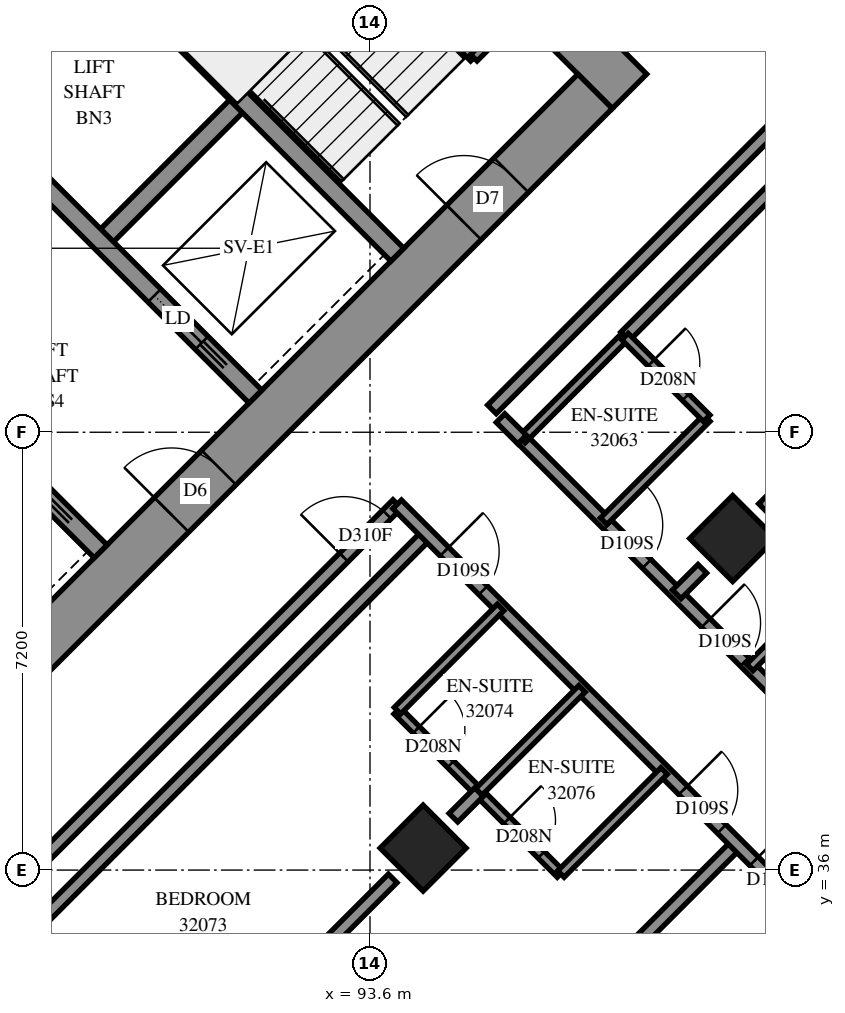
"""IFC4 building model, lengths in metres.
Left out: names, types, materials, properties, quantities, classifications, styles, units other than length and angle.
Written with IfcOpenShell. Run it as: python <this file> out.ifc"""

import sys

from ifc_helpers import new_model, si_unit, direction, frame, frame_2d, origin, origin_2d, place, context, subcontext, project, spatial, rectangle, extrude, element, fill, save


model = new_model("IFC4")
c1 = context("Model", 3, precision=1e-05, world=origin(), true_north=direction((0.0, 1.0)))
c2 = subcontext(c1, "Body", "Model", "MODEL_VIEW")
j1 = project(units=[si_unit("LENGTHUNIT", "METRE"), si_unit("PLANEANGLEUNIT", "RADIAN")], contexts=[c1])
p1 = place(None, origin())
s1 = spatial("IfcSite", under=j1, at=p1, CompositionType="ELEMENT")
p2 = place(p1, origin())
s2 = spatial("IfcBuilding", under=s1, at=p2, CompositionType="ELEMENT")
p3 = place(p2, frame((0.0, 0.0, 118.6)))
s3 = spatial("IfcBuildingStorey", under=s2, at=p3, CompositionType="ELEMENT", Elevation=118.6)
for number, where, z_axis, x_axis in (
    (1, (99.565, 41.453, 0.0), (0.0, 0.0, 1.0), (0.707, -0.707, 0.0)),
    (2, (94.474, 36.362, 0.0), (0.0, 0.0, 1.0), (0.707, -0.707, 0.0)),
):
    element("IfcColumn", number, at=place(p3, frame(where, z_axis=z_axis, x_axis=x_axis)), inside=s3, PredefinedType="COLUMN", context=c2, shape_type="SweptSolid", body=[
        extrude(rectangle(XDim=1.0, YDim=1.0, at=origin_2d()), origin(), (0.0, 0.0, 1.0), 3.1),
    ])
p4 = place(p3, frame((86.554, 60.121, -0.3), z_axis=(0.0, 0.0, 1.0), x_axis=(0.7071067812, -0.7071067812, 0.0)))
e3 = element("IfcWall", 3, at=p4, inside=s3, PredefinedType="SHEAR", context=c2, shape_type="SweptSolid", body=[
    extrude(rectangle(XDim=16.0, YDim=0.8, at=frame_2d((8.0, 0.0))), origin(), (0.0, 0.0, 1.0), 2.7),
])
p5 = place(p4, frame((10.8, 0.0, 0.3)))
e4 = element("IfcOpeningElement", 4, at=p5, cuts=e3, PredefinedType="OPENING", context=c2, shape_type="SweptSolid", body=[
    extrude(rectangle(XDim=0.8, YDim=2.1, at=frame_2d((0.4, 1.05))), frame((0.0, 0.41, 0.0), z_axis=(0.0, -1.0, 0.0), x_axis=(1.0, 0.0, 0.0)), (0.0, 0.0, 1.0), 0.82),
])
p6 = place(p3, frame((87.12, 38.625, -0.3), z_axis=(0.0, 0.0, 1.0), x_axis=(0.7071067812, 0.7071067812, 0.0)))
e5 = element("IfcWall", 5, at=p6, inside=s3, PredefinedType="SHEAR", context=c2, shape_type="SweptSolid", body=[
    extrude(rectangle(XDim=14.4, YDim=0.8, at=frame_2d((7.2, 0.0))), origin(), (0.0, 0.0, 1.0), 2.7),
])
p7 = place(p6, frame((4.55, 0.0, 0.3)))
e6 = element("IfcOpeningElement", 6, at=p7, cuts=e5, PredefinedType="OPENING", context=c2, shape_type="SweptSolid", body=[
    extrude(rectangle(XDim=1.1, YDim=2.1, at=frame_2d((0.55, 1.05))), frame((0.0, 0.41, 0.0), z_axis=(0.0, -1.0, 0.0), x_axis=(1.0, 0.0, 0.0)), (0.0, 0.0, 1.0), 0.82),
])
p8 = place(p6, frame((11.35, 0.0, 0.3)))
e7 = element("IfcOpeningElement", 7, at=p8, cuts=e5, PredefinedType="OPENING", context=c2, shape_type="SweptSolid", body=[
    extrude(rectangle(XDim=1.1, YDim=2.1, at=frame_2d((0.55, 1.05))), frame((0.0, 0.41, 0.0), z_axis=(0.0, -1.0, 0.0), x_axis=(1.0, 0.0, 0.0)), (0.0, 0.0, 1.0), 0.82),
])
for number, where, z_axis, x_axis in (
    (8, (86.625, 48.878, 0.0), (0.0, 0.0, 1.0), (0.707, 0.707, 0.0)),
    (9, (89.17, 46.332, 0.0), (0.0, 0.0, 1.0), (0.707, 0.707, 0.0)),
):
    element("IfcWall", number, at=place(p3, frame(where, z_axis=z_axis, x_axis=x_axis)), inside=s3, PredefinedType="SOLIDWALL", context=c2, shape_type="SweptSolid", body=[
        extrude(rectangle(XDim=3.3, YDim=0.3, at=frame_2d((1.65, 0.0))), origin(), (0.0, 0.0, 1.0), 3.1),
    ])
p9 = place(p3, frame((78.988, 51.423, 0.0), z_axis=(0.0, 0.0, 1.0), x_axis=(0.7071067812, -0.7071067812, 0.0)))
e10 = element("IfcWall", 10, at=p9, inside=s3, PredefinedType="SOLIDWALL", context=c2, shape_type="SweptSolid", body=[
    extrude(rectangle(XDim=14.4, YDim=0.3, at=frame_2d((7.2, 0.0))), origin(), (0.0, 0.0, 1.0), 3.1),
])
p10 = place(p9, frame((1.25, 0.0, 0.0)))
e11 = element("IfcOpeningElement", 11, at=p10, cuts=e10, PredefinedType="OPENING", context=c2, shape_type="SweptSolid", body=[
    extrude(rectangle(XDim=1.1, YDim=2.1, at=frame_2d((0.55, 1.05))), frame((0.0, 0.16, 0.0), z_axis=(0.0, -1.0, 0.0), x_axis=(1.0, 0.0, 0.0)), (0.0, 0.0, 1.0), 0.32),
])
p11 = place(p9, frame((4.85, 0.0, 0.0)))
e12 = element("IfcOpeningElement", 12, at=p11, cuts=e10, PredefinedType="OPENING", context=c2, shape_type="SweptSolid", body=[
    extrude(rectangle(XDim=1.1, YDim=2.1, at=frame_2d((0.55, 1.05))), frame((0.0, 0.16, 0.0), z_axis=(0.0, -1.0, 0.0), x_axis=(1.0, 0.0, 0.0)), (0.0, 0.0, 1.0), 0.32),
])
p12 = place(p9, frame((8.45, 0.0, 0.0)))
e13 = element("IfcOpeningElement", 13, at=p12, cuts=e10, PredefinedType="OPENING", context=c2, shape_type="SweptSolid", body=[
    extrude(rectangle(XDim=1.1, YDim=2.1, at=frame_2d((0.55, 1.05))), frame((0.0, 0.16, 0.0), z_axis=(0.0, -1.0, 0.0), x_axis=(1.0, 0.0, 0.0)), (0.0, 0.0, 1.0), 0.32),
])
p13 = place(p9, frame((12.05, 0.0, 0.0)))
e14 = element("IfcOpeningElement", 14, at=p13, cuts=e10, PredefinedType="OPENING", context=c2, shape_type="SweptSolid", body=[
    extrude(rectangle(XDim=1.1, YDim=2.1, at=frame_2d((0.55, 1.05))), frame((0.0, 0.16, 0.0), z_axis=(0.0, -1.0, 0.0), x_axis=(1.0, 0.0, 0.0)), (0.0, 0.0, 1.0), 0.32),
])
p14 = place(p3, frame((81.534, 53.969, 0.0), z_axis=(0.0, 0.0, 1.0), x_axis=(0.707103309, -0.7071102534, 0.0)))
e15 = element("IfcWall", 15, at=p14, inside=s3, PredefinedType="SOLIDWALL", context=c2, shape_type="SweptSolid", body=[
    extrude(rectangle(XDim=14.4, YDim=0.3, at=frame_2d((7.2, 0.0))), origin(), (0.0, 0.0, 1.0), 3.1),
])
p15 = place(p14, frame((12.05, 0.0, 0.0)))
e16 = element("IfcOpeningElement", 16, at=p15, cuts=e15, PredefinedType="OPENING", context=c2, shape_type="SweptSolid", body=[
    extrude(rectangle(XDim=1.1, YDim=2.1, at=frame_2d((0.55, 1.05))), frame((0.0, 0.16, 0.0), z_axis=(0.0, -1.0, 0.0), x_axis=(1.0, 0.0, 0.0)), (0.0, 0.0, 1.0), 0.32),
])
p16 = place(p3, frame((88.958, 51.211, 0.0), z_axis=(0.0, 0.0, 1.0), x_axis=(0.7070998367, -0.7071137256, 0.0)))
e17 = element("IfcWall", 17, at=p16, inside=s3, PredefinedType="SOLIDWALL", context=c2, shape_type="SweptSolid", body=[
    extrude(rectangle(XDim=7.2, YDim=0.3, at=frame_2d((3.6, 0.0))), origin(), (0.0, 0.0, 1.0), 3.1),
])
p17 = place(p3, frame((91.313, 53.354, 0.0), z_axis=(0.0, 0.0, 1.0), x_axis=(0.7071067812, -0.7071067812, 0.0)))
e18 = element("IfcWall", 18, at=p17, inside=s3, PredefinedType="PARTITIONING", context=c2, shape_type="SweptSolid", body=[
    extrude(rectangle(XDim=5.65, YDim=0.15, at=frame_2d((2.825, 0.0))), origin(), (0.0, 0.0, 1.0), 3.1),
])
p18 = place(p3, frame((95.308, 49.358, 0.0), z_axis=(0.0, 0.0, 1.0), x_axis=(0.70705776, 0.707155799, 0.0)))
e19 = element("IfcWall", 19, at=p18, inside=s3, PredefinedType="PARTITIONING", context=c2, shape_type="SweptSolid", body=[
    extrude(rectangle(XDim=1.02, YDim=0.15, at=frame_2d((0.51, 0.0))), origin(), (0.0, 0.0, 1.0), 3.1),
])
p19 = place(p3, frame((86.329, 33.31, 0.0), z_axis=(0.0, 0.0, 1.0), x_axis=(0.7071067812, 0.7071067812, 0.0)))
e20 = element("IfcWall", 20, at=p19, inside=s3, PredefinedType="PARTITIONING", context=c2, shape_type="SweptSolid", body=[
    extrude(rectangle(XDim=11.617, YDim=0.2, at=frame_2d((5.808, 0.0))), origin(), (0.0, 0.0, 1.0), 3.1),
])
p20 = place(p3, frame((91.45, 28.248, 0.0), z_axis=(0.0, 0.0, 1.0), x_axis=(0.7071931644, 0.7070203875, 0.0)))
e21 = element("IfcWall", 21, at=p20, inside=s3, PredefinedType="PARTITIONING", context=c2, shape_type="SweptSolid", body=[
    extrude(rectangle(XDim=11.576, YDim=0.2, at=frame_2d((5.788, 0.0))), origin(), (0.0, 0.0, 1.0), 3.1),
])
p21 = place(p3, frame((86.835, 34.806, 0.0), z_axis=(0.0, 0.0, 1.0), x_axis=(0.7071067812, 0.7071067812, 0.0)))
e22 = element("IfcWall", 22, at=p21, inside=s3, PredefinedType="PARTITIONING", context=c2, shape_type="SweptSolid", body=[
    extrude(rectangle(XDim=10.201, YDim=0.2, at=frame_2d((5.1, 0.0))), origin(), (0.0, 0.0, 1.0), 3.1),
])
p22 = place(p21, frame((8.959, 0.0, 0.0)))
e23 = element("IfcOpeningElement", 23, at=p22, cuts=e22, PredefinedType="OPENING", context=c2, shape_type="SweptSolid", body=[
    extrude(rectangle(XDim=1.0, YDim=2.1, at=frame_2d((0.5, 1.05))), frame((0.0, 0.11, 0.0), z_axis=(0.0, -1.0, 0.0), x_axis=(1.0, 0.0, 0.0)), (0.0, 0.0, 1.0), 0.22),
])
p23 = place(p3, frame((94.047, 42.015, 0.0), z_axis=(0.0, 0.0, 1.0), x_axis=(0.7071067812, -0.7071067812, 0.0)))
e24 = element("IfcWall", 24, at=p23, inside=s3, PredefinedType="PARTITIONING", context=c2, shape_type="SweptSolid", body=[
    extrude(rectangle(XDim=9.6, YDim=0.2, at=frame_2d((4.8, 0.0))), origin(), (0.0, 0.0, 1.0), 3.1),
])
p24 = place(p23, frame((1.099, 0.0, 0.0)))
e25 = element("IfcOpeningElement", 25, at=p24, cuts=e24, PredefinedType="OPENING", context=c2, shape_type="SweptSolid", body=[
    extrude(rectangle(XDim=0.9, YDim=2.1, at=frame_2d((0.45, 1.05))), frame((0.0, 0.11, 0.0), z_axis=(0.0, -1.0, 0.0), x_axis=(1.0, 0.0, 0.0)), (0.0, 0.0, 1.0), 0.22),
])
p25 = place(p23, frame((6.649, 0.0, 0.0)))
e26 = element("IfcOpeningElement", 26, at=p25, cuts=e24, PredefinedType="OPENING", context=c2, shape_type="SweptSolid", body=[
    extrude(rectangle(XDim=0.9, YDim=2.1, at=frame_2d((0.45, 1.05))), frame((0.0, 0.11, 0.0), z_axis=(0.0, -1.0, 0.0), x_axis=(1.0, 0.0, 0.0)), (0.0, 0.0, 1.0), 0.22),
])
p26 = place(p23, frame((8.3, 0.0, 0.0)))
e27 = element("IfcOpeningElement", 27, at=p26, cuts=e24, PredefinedType="OPENING", context=c2, shape_type="SweptSolid", body=[
    extrude(rectangle(XDim=0.9, YDim=2.1, at=frame_2d((0.45, 1.05))), frame((0.0, 0.11, 0.0), z_axis=(0.0, -1.0, 0.0), x_axis=(1.0, 0.0, 0.0)), (0.0, 0.0, 1.0), 0.22),
])
p27 = place(p3, frame((96.103, 43.083, 0.0), z_axis=(0.0, 0.0, 1.0), x_axis=(0.7071067812, -0.7071067812, 0.0)))
e28 = element("IfcWall", 28, at=p27, inside=s3, PredefinedType="PARTITIONING", context=c2, shape_type="SweptSolid", body=[
    extrude(rectangle(XDim=8.491, YDim=0.2, at=frame_2d((4.245, 0.0))), origin(), (0.0, 0.0, 1.0), 3.1),
])
p28 = place(p27, frame((1.995, 0.0, 0.0)))
e29 = element("IfcOpeningElement", 29, at=p28, cuts=e28, PredefinedType="OPENING", context=c2, shape_type="SweptSolid", body=[
    extrude(rectangle(XDim=0.9, YDim=2.1, at=frame_2d((0.45, 1.05))), frame((0.0, 0.11, 0.0), z_axis=(0.0, -1.0, 0.0), x_axis=(1.0, 0.0, 0.0)), (0.0, 0.0, 1.0), 0.22),
])
p29 = place(p27, frame((4.27, 0.0, 0.0)))
e30 = element("IfcOpeningElement", 30, at=p29, cuts=e28, PredefinedType="OPENING", context=c2, shape_type="SweptSolid", body=[
    extrude(rectangle(XDim=0.9, YDim=2.1, at=frame_2d((0.45, 1.05))), frame((0.0, 0.11, 0.0), z_axis=(0.0, -1.0, 0.0), x_axis=(1.0, 0.0, 0.0)), (0.0, 0.0, 1.0), 0.22),
])
p30 = place(p3, frame((95.606, 43.577, 0.0), z_axis=(0.0, 0.0, 1.0), x_axis=(0.7071067812, 0.7071067812, 0.0)))
e31 = element("IfcWall", 31, at=p30, inside=s3, PredefinedType="PARTITIONING", context=c2, shape_type="SweptSolid", body=[
    extrude(rectangle(XDim=7.798, YDim=0.2, at=frame_2d((3.899, 0.0))), origin(), (0.0, 0.0, 1.0), 3.1),
])
p31 = place(p3, frame((97.795, 44.777, 0.0), z_axis=(0.0, 0.0, 1.0), x_axis=(0.7071136921, 0.7070998702, 0.0)))
e32 = element("IfcWall", 32, at=p31, inside=s3, PredefinedType="PARTITIONING", context=c2, shape_type="SweptSolid", body=[
    extrude(rectangle(XDim=7.235, YDim=0.2, at=frame_2d((3.617, 0.0))), origin(), (0.0, 0.0, 1.0), 3.1),
])
for number, where, z_axis, x_axis in (
    (33, (89.881, 31.771, 0.0), (0.0, 0.0, 1.0), (0.707, 0.707, 0.0)),
    (34, (100.063, 41.953, 0.0), (0.0, 0.0, 1.0), (0.707, 0.707, 0.0)),
):
    element("IfcWall", number, at=place(p3, frame(where, z_axis=z_axis, x_axis=x_axis)), inside=s3, PredefinedType="PARTITIONING", context=c2, shape_type="SweptSolid", body=[
        extrude(rectangle(XDim=5.787, YDim=0.2, at=frame_2d((2.893, 0.0))), origin(), (0.0, 0.0, 1.0), 3.1),
    ])
p32 = place(p3, frame((94.047, 38.621, 0.0), z_axis=(0.0, 0.0, 1.0), x_axis=(0.7071067812, -0.7071067812, 0.0)))
e35 = element("IfcWall", 35, at=p32, inside=s3, PredefinedType="PARTITIONING", context=c2, shape_type="SweptSolid", body=[
    extrude(rectangle(XDim=3.799, YDim=0.15, at=frame_2d((1.899, 0.0))), origin(), (0.0, 0.0, 1.0), 3.1),
])
p33 = place(p32, frame((0.444, 0.0, 0.0)))
e36 = element("IfcOpeningElement", 36, at=p33, cuts=e35, PredefinedType="OPENING", context=c2, shape_type="SweptSolid", body=[
    extrude(rectangle(XDim=0.8, YDim=2.1, at=frame_2d((0.4, 1.05))), frame((0.0, 0.085, 0.0), z_axis=(0.0, -1.0, 0.0), x_axis=(1.0, 0.0, 0.0)), (0.0, 0.0, 1.0), 0.17),
])
p34 = place(p32, frame((2.551, 0.0, 0.0)))
e37 = element("IfcOpeningElement", 37, at=p34, cuts=e35, PredefinedType="OPENING", context=c2, shape_type="SweptSolid", body=[
    extrude(rectangle(XDim=0.8, YDim=2.1, at=frame_2d((0.4, 1.05))), frame((0.0, 0.085, 0.0), z_axis=(0.0, -1.0, 0.0), x_axis=(1.0, 0.0, 0.0)), (0.0, 0.0, 1.0), 0.17),
])
p35 = place(p3, frame((99.071, 51.133, 0.0), z_axis=(0.0, 0.0, 1.0), x_axis=(0.7071067812, -0.7071067812, 0.0)))
e38 = element("IfcWall", 38, at=p35, inside=s3, PredefinedType="PARTITIONING", context=c2, shape_type="SweptSolid", body=[
    extrude(rectangle(XDim=2.893, YDim=0.2, at=frame_2d((1.447, 0.0))), origin(), (0.0, 0.0, 1.0), 3.1),
])
for number, where, z_axis, x_axis in (
    (39, (95.389, 37.285, 0.0), (0.0, 0.0, 1.0), (0.708, 0.707, 0.0)),
    (40, (94.052, 38.622, 0.0), (0.0, 0.0, 1.0), (0.707, 0.708, 0.0)),
    (41, (96.739, 35.935, 0.0), (0.0, 0.0, 1.0), (0.708, 0.707, 0.0)),
    (42, (99.143, 33.531, 0.0), (0.0, 0.0, 1.0), (0.708, 0.707, 0.0)),
):
    element("IfcWall", number, at=place(p3, frame(where, z_axis=z_axis, x_axis=x_axis)), inside=s3, PredefinedType="PARTITIONING", context=c2, shape_type="SweptSolid", body=[
        extrude(rectangle(XDim=2.4, YDim=0.15, at=frame_2d((1.2, 0.0))), origin(), (0.0, 0.0, 1.0), 3.1),
    ])
for number, where, z_axis, x_axis in (
    (43, (97.443, 41.737, 0.0), (0.0, 0.0, 1.0), (0.707, 0.707, 0.0)),
    (44, (96.099, 43.081, 0.0), (0.0, 0.0, 1.0), (0.707, 0.707, 0.0)),
    (45, (99.847, 39.333, 0.0), (0.0, 0.0, 1.0), (0.707, 0.707, 0.0)),
):
    element("IfcWall", number, at=place(p3, frame(where, z_axis=z_axis, x_axis=x_axis)), inside=s3, PredefinedType="PARTITIONING", context=c2, shape_type="SweptSolid", body=[
        extrude(rectangle(XDim=2.398, YDim=0.15, at=frame_2d((1.199, 0.0))), origin(), (0.0, 0.0, 1.0), 3.1),
    ])
p36 = place(p3, frame((97.793, 44.773, 0.0), z_axis=(0.0, 0.0, 1.0), x_axis=(0.7071067812, -0.7071067812, 0.0)))
e46 = element("IfcWall", 46, at=p36, inside=s3, PredefinedType="PARTITIONING", context=c2, shape_type="SweptSolid", body=[
    extrude(rectangle(XDim=1.901, YDim=0.15, at=frame_2d((0.95, 0.0))), origin(), (0.0, 0.0, 1.0), 3.1),
])
p37 = place(p36, frame((0.609, 0.0, 0.0)))
e47 = element("IfcOpeningElement", 47, at=p37, cuts=e46, PredefinedType="OPENING", context=c2, shape_type="SweptSolid", body=[
    extrude(rectangle(XDim=0.8, YDim=2.1, at=frame_2d((0.4, 1.05))), frame((0.0, 0.085, 0.0), z_axis=(0.0, -1.0, 0.0), x_axis=(1.0, 0.0, 0.0)), (0.0, 0.0, 1.0), 0.17),
])
for number, where, z_axis, x_axis in (
    (48, (94.972, 36.862, 0.0), (0.0, 0.0, 1.0), (0.707, 0.707, 0.0)),
    (49, (98.645, 40.535, 0.0), (0.0, 0.0, 1.0), (0.707, 0.707, 0.0)),
):
    element("IfcWall", number, at=place(p3, frame(where, z_axis=z_axis, x_axis=x_axis)), inside=s3, PredefinedType="PARTITIONING", context=c2, shape_type="SweptSolid", body=[
        extrude(rectangle(XDim=0.594, YDim=0.2, at=frame_2d((0.297, 0.0))), origin(), (0.0, 0.0, 1.0), 3.1),
    ])
p38 = place(p3, frame((95.747, 43.433, 0.0), z_axis=(0.0, 0.0, 1.0), x_axis=(0.7091070712, -0.7051008166, 0.0)))
e50 = element("IfcWall", 50, at=p38, inside=s3, PredefinedType="PARTITIONING", context=c2, shape_type="SweptSolid", body=[
    extrude(rectangle(XDim=0.499, YDim=0.2, at=frame_2d((0.25, 0.0))), origin(), (0.0, 0.0, 1.0), 3.1),
])
p39 = place(p7, origin())
e51 = element("IfcDoor", 51, at=p39, inside=s3, OperationType="DOUBLE_DOOR_SINGLE_SWING", PredefinedType="DOOR", context=c2, shape_type="SweptSolid", body=[
    extrude(rectangle(XDim=1.1, YDim=2.1, at=frame_2d((0.55, 1.05))), frame((0.0, 0.025, 0.0), z_axis=(0.0, -1.0, 0.0), x_axis=(1.0, 0.0, 0.0)), (0.0, 0.0, 1.0), 0.05),
])
fill(e6, e51)
p40 = place(p8, origin())
e52 = element("IfcDoor", 52, at=p40, inside=s3, OperationType="SINGLE_SWING_RIGHT", PredefinedType="DOOR", context=c2, shape_type="SweptSolid", body=[
    extrude(rectangle(XDim=1.1, YDim=2.1, at=frame_2d((0.55, 1.05))), frame((0.0, 0.025, 0.0), z_axis=(0.0, -1.0, 0.0), x_axis=(1.0, 0.0, 0.0)), (0.0, 0.0, 1.0), 0.05),
])
fill(e7, e52)
p41 = place(p15, origin())
e53 = element("IfcDoor", 53, at=p41, inside=s3, OperationType="SLIDING_TO_RIGHT", PredefinedType="DOOR", context=c2, shape_type="SweptSolid", body=[
    extrude(rectangle(XDim=1.1, YDim=2.1, at=frame_2d((0.55, 1.05))), frame((0.0, 0.025, 0.0), z_axis=(0.0, -1.0, 0.0), x_axis=(1.0, 0.0, 0.0)), (0.0, 0.0, 1.0), 0.05),
])
fill(e16, e53)
p42 = place(p28, origin())
e54 = element("IfcDoor", 54, at=p42, inside=s3, OperationType="SINGLE_SWING_RIGHT", PredefinedType="DOOR", context=c2, shape_type="SweptSolid", body=[
    extrude(rectangle(XDim=0.9, YDim=2.1, at=frame_2d((0.45, 1.05))), frame((0.0, 0.025, 0.0), z_axis=(0.0, -1.0, 0.0), x_axis=(1.0, 0.0, 0.0)), (0.0, 0.0, 1.0), 0.05),
])
fill(e29, e54)
p43 = place(p37, origin())
e55 = element("IfcDoor", 55, at=p43, inside=s3, OperationType="SINGLE_SWING_RIGHT", PredefinedType="DOOR", context=c2, shape_type="SweptSolid", body=[
    extrude(rectangle(XDim=0.8, YDim=2.1, at=frame_2d((0.4, 1.05))), frame((0.0, 0.025, 0.0), z_axis=(0.0, -1.0, 0.0), x_axis=(1.0, 0.0, 0.0)), (0.0, 0.0, 1.0), 0.05),
])
fill(e47, e55)
p44 = place(p29, origin())
e56 = element("IfcDoor", 56, at=p44, inside=s3, OperationType="SINGLE_SWING_LEFT", PredefinedType="DOOR", context=c2, shape_type="SweptSolid", body=[
    extrude(rectangle(XDim=0.9, YDim=2.1, at=frame_2d((0.45, 1.05))), frame((0.0, 0.025, 0.0), z_axis=(0.0, -1.0, 0.0), x_axis=(1.0, 0.0, 0.0)), (0.0, 0.0, 1.0), 0.05),
])
fill(e30, e56)
p45 = place(p22, origin())
e57 = element("IfcDoor", 57, at=p45, inside=s3, OperationType="SINGLE_SWING_LEFT", PredefinedType="DOOR", context=c2, shape_type="SweptSolid", body=[
    extrude(rectangle(XDim=1.0, YDim=2.1, at=frame_2d((0.5, 1.05))), frame((0.0, 0.025, 0.0), z_axis=(0.0, -1.0, 0.0), x_axis=(1.0, 0.0, 0.0)), (0.0, 0.0, 1.0), 0.05),
])
fill(e23, e57)
p46 = place(p24, origin())
e58 = element("IfcDoor", 58, at=p46, inside=s3, OperationType="SINGLE_SWING_LEFT", PredefinedType="DOOR", context=c2, shape_type="SweptSolid", body=[
    extrude(rectangle(XDim=0.9, YDim=2.1, at=frame_2d((0.45, 1.05))), frame((0.0, 0.025, 0.0), z_axis=(0.0, -1.0, 0.0), x_axis=(1.0, 0.0, 0.0)), (0.0, 0.0, 1.0), 0.05),
])
fill(e25, e58)
p47 = place(p33, origin())
e59 = element("IfcDoor", 59, at=p47, inside=s3, OperationType="SINGLE_SWING_RIGHT", PredefinedType="DOOR", context=c2, shape_type="SweptSolid", body=[
    extrude(rectangle(XDim=0.8, YDim=2.1, at=frame_2d((0.4, 1.05))), frame((0.0, 0.025, 0.0), z_axis=(0.0, -1.0, 0.0), x_axis=(1.0, 0.0, 0.0)), (0.0, 0.0, 1.0), 0.05),
])
fill(e36, e59)
p48 = place(p25, origin())
e60 = element("IfcDoor", 60, at=p48, inside=s3, OperationType="SINGLE_SWING_RIGHT", PredefinedType="DOOR", context=c2, shape_type="SweptSolid", body=[
    extrude(rectangle(XDim=0.9, YDim=2.1, at=frame_2d((0.45, 1.05))), frame((0.0, 0.025, 0.0), z_axis=(0.0, -1.0, 0.0), x_axis=(1.0, 0.0, 0.0)), (0.0, 0.0, 1.0), 0.05),
])
fill(e26, e60)
p49 = place(p34, origin())
e61 = element("IfcDoor", 61, at=p49, inside=s3, OperationType="SINGLE_SWING_RIGHT", PredefinedType="DOOR", context=c2, shape_type="SweptSolid", body=[
    extrude(rectangle(XDim=0.8, YDim=2.1, at=frame_2d((0.4, 1.05))), frame((0.0, 0.025, 0.0), z_axis=(0.0, -1.0, 0.0), x_axis=(1.0, 0.0, 0.0)), (0.0, 0.0, 1.0), 0.05),
])
fill(e37, e61)
p50 = place(p26, origin())
e62 = element("IfcDoor", 62, at=p50, inside=s3, OperationType="SINGLE_SWING_LEFT", PredefinedType="DOOR", context=c2, shape_type="SweptSolid", body=[
    extrude(rectangle(XDim=0.9, YDim=2.1, at=frame_2d((0.45, 1.05))), frame((0.0, 0.025, 0.0), z_axis=(0.0, -1.0, 0.0), x_axis=(1.0, 0.0, 0.0)), (0.0, 0.0, 1.0), 0.05),
])
fill(e27, e62)
save(model, sys.argv[1])
